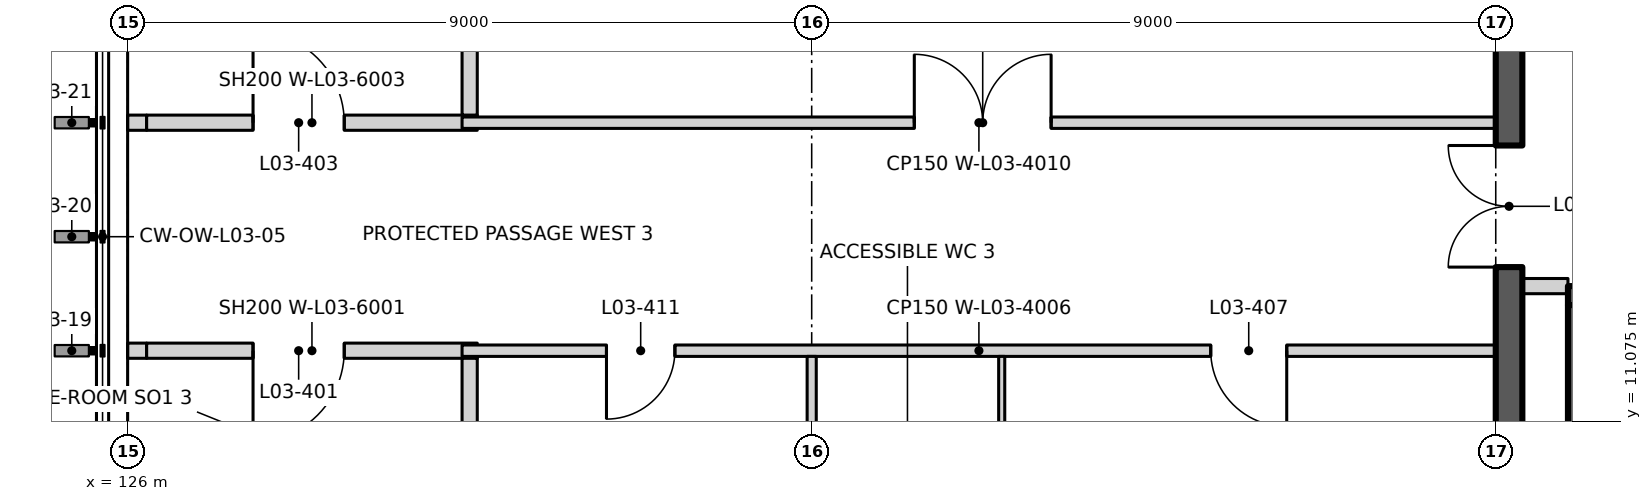
"""IFC4 building model, lengths in metres.
Left out: names, types, materials, properties, quantities, classifications, styles, units other than length and angle.
Written with IfcOpenShell. Run it as: python <this file> out.ifc"""

import sys

from ifc_helpers import new_model, si_unit, direction, frame, frame_2d, origin, place, context, subcontext, project, spatial, rectangle, extrude, element, fill, save


model = new_model("IFC4")
c1 = context("Model", 3, precision=1e-05, world=origin(), true_north=direction((0.0, 1.0)))
c2 = subcontext(c1, "Body", "Model", "MODEL_VIEW")
j1 = project(units=[si_unit("LENGTHUNIT", "METRE"), si_unit("PLANEANGLEUNIT", "RADIAN")], contexts=[c1])
p1 = place(None, origin())
s1 = spatial("IfcSite", under=j1, at=p1, CompositionType="ELEMENT")
p2 = place(p1, origin())
s2 = spatial("IfcBuilding", under=s1, at=p2, CompositionType="ELEMENT")
p3 = place(p2, frame((0.0, 0.0, 15.0)))
s3 = spatial("IfcBuildingStorey", under=s2, at=p3, CompositionType="ELEMENT", Elevation=15.0)
p4 = place(p3, frame((144.95, 12.725, 0.0), z_axis=(0.0, 0.0, 1.0), x_axis=(1.0, 0.0, 0.0)))
e1 = element("IfcWall", 1, at=p4, inside=s3, PredefinedType="SHEAR", context=c2, shape_type="SweptSolid", body=[
    extrude(rectangle(XDim=12.05, YDim=0.25, at=frame_2d((6.025, 0.0))), origin(), (0.0, 0.0, 1.0), 4.5),
])
p5 = place(p4, frame((1.05, 0.0, 0.0)))
e2 = element("IfcOpeningElement", 2, at=p5, cuts=e1, PredefinedType="OPENING", context=c2, shape_type="SweptSolid", body=[
    extrude(rectangle(XDim=1.1, YDim=2.1, at=frame_2d((0.55, 1.05))), frame((0.0, 0.135, 0.0), z_axis=(0.0, -1.0, 0.0), x_axis=(1.0, 0.0, 0.0)), (0.0, 0.0, 1.0), 0.27),
])
p6 = place(p4, frame((4.0, 0.0, 0.0)))
e3 = element("IfcOpeningElement", 3, at=p6, cuts=e1, PredefinedType="OPENING", context=c2, shape_type="SweptSolid", body=[
    extrude(rectangle(XDim=1.1, YDim=2.1, at=frame_2d((0.55, 1.05))), frame((0.0, 0.135, 0.0), z_axis=(0.0, -1.0, 0.0), x_axis=(1.0, 0.0, 0.0)), (0.0, 0.0, 1.0), 0.27),
])
p7 = place(p4, frame((6.95, 0.0, 0.0)))
e4 = element("IfcOpeningElement", 4, at=p7, cuts=e1, PredefinedType="OPENING", context=c2, shape_type="SweptSolid", body=[
    extrude(rectangle(XDim=1.1, YDim=2.1, at=frame_2d((0.55, 1.05))), frame((0.0, 0.135, 0.0), z_axis=(0.0, -1.0, 0.0), x_axis=(1.0, 0.0, 0.0)), (0.0, 0.0, 1.0), 0.27),
])
p8 = place(p4, frame((9.9, 0.0, 0.0)))
e5 = element("IfcOpeningElement", 5, at=p8, cuts=e1, PredefinedType="OPENING", context=c2, shape_type="SweptSolid", body=[
    extrude(rectangle(XDim=1.1, YDim=2.1, at=frame_2d((0.55, 1.05))), frame((0.0, 0.135, 0.0), z_axis=(0.0, -1.0, 0.0), x_axis=(1.0, 0.0, 0.0)), (0.0, 0.0, 1.0), 0.27),
])
p9 = place(p3, frame((145.075, 9.9, 0.0), z_axis=(0.0, 0.0, 1.0), x_axis=(0.0, 1.0, 0.0)))
e6 = element("IfcWall", 6, at=p9, inside=s3, PredefinedType="SHEAR", context=c2, shape_type="SweptSolid", body=[
    extrude(rectangle(XDim=2.7, YDim=0.25, at=frame_2d((1.35, 0.0))), origin(), (0.0, 0.0, 1.0), 4.5),
])
p10 = place(p3, frame((126.0, 12.0, 0.0), z_axis=(0.0, 0.0, 1.0), x_axis=(1.0, 0.0, 0.0)))
e7 = element("IfcWall", 7, at=p10, inside=s3, PredefinedType="PARTITIONING", context=c2, shape_type="SweptSolid", body=[
    extrude(rectangle(XDim=0.25, YDim=0.2, at=frame_2d((0.125, 0.0))), origin(), (0.0, 0.0, 1.0), 3.6),
])
p11 = place(p3, frame((126.25, 12.0, 0.0), z_axis=(0.0, 0.0, 1.0), x_axis=(1.0, 0.0, 0.0)))
e8 = element("IfcWall", 8, at=p11, inside=s3, PredefinedType="PARTITIONING", context=c2, shape_type="SweptSolid", body=[
    extrude(rectangle(XDim=4.35, YDim=0.2, at=frame_2d((2.175, 0.0))), origin(), (0.0, 0.0, 1.0), 4.2),
])
p12 = place(p11, frame((2.6, 0.0, 0.0), z_axis=(0.0, 0.0, 1.0), x_axis=(-1.0, 0.0, 0.0)))
e9 = element("IfcOpeningElement", 9, at=p12, cuts=e8, PredefinedType="OPENING", context=c2, shape_type="SweptSolid", body=[
    extrude(rectangle(XDim=1.2, YDim=2.1, at=frame_2d((0.6, 1.05))), frame((0.0, 0.11, 0.0), z_axis=(0.0, -1.0, 0.0), x_axis=(1.0, 0.0, 0.0)), (0.0, 0.0, 1.0), 0.22),
])
p13 = place(p3, frame((130.4, 12.0, 0.0), z_axis=(0.0, 0.0, 1.0), x_axis=(1.0, 0.0, 0.0)))
e10 = element("IfcWall", 10, at=p13, inside=s3, PredefinedType="PARTITIONING", context=c2, shape_type="SweptSolid", body=[
    extrude(rectangle(XDim=13.6, YDim=0.15, at=frame_2d((6.8, 0.0))), origin(), (0.0, 0.0, 1.0), 4.2),
])
p14 = place(p13, frame((10.85, 0.0, 0.0), z_axis=(0.0, 0.0, 1.0), x_axis=(-1.0, 0.0, 0.0)))
e11 = element("IfcOpeningElement", 11, at=p14, cuts=e10, PredefinedType="OPENING", context=c2, shape_type="SweptSolid", body=[
    extrude(rectangle(XDim=1.0, YDim=2.1, at=frame_2d((0.5, 1.05))), frame((0.0, 0.085, 0.0), z_axis=(0.0, -1.0, 0.0), x_axis=(1.0, 0.0, 0.0)), (0.0, 0.0, 1.0), 0.17),
])
p15 = place(p13, frame((2.8, 0.0, 0.0), z_axis=(0.0, 0.0, 1.0), x_axis=(-1.0, 0.0, 0.0)))
e12 = element("IfcOpeningElement", 12, at=p15, cuts=e10, PredefinedType="OPENING", context=c2, shape_type="SweptSolid", body=[
    extrude(rectangle(XDim=0.9, YDim=2.1, at=frame_2d((0.45, 1.05))), frame((0.0, 0.085, 0.0), z_axis=(0.0, -1.0, 0.0), x_axis=(1.0, 0.0, 0.0)), (0.0, 0.0, 1.0), 0.17),
])
p16 = place(p3, frame((144.35, 12.85, 0.0), z_axis=(0.0, 0.0, 1.0), x_axis=(1.0, 0.0, 0.0)))
e13 = element("IfcWall", 13, at=p16, inside=s3, PredefinedType="PARTITIONING", context=c2, shape_type="SweptSolid", body=[
    extrude(rectangle(XDim=0.6, YDim=0.2, at=frame_2d((0.3, 0.0))), origin(), (0.0, 0.0, 1.0), 4.2),
])
p17 = place(p3, frame((126.0, 15.0, 0.0), z_axis=(0.0, 0.0, 1.0), x_axis=(1.0, 0.0, 0.0)))
e14 = element("IfcWall", 14, at=p17, inside=s3, PredefinedType="PARTITIONING", context=c2, shape_type="SweptSolid", body=[
    extrude(rectangle(XDim=0.25, YDim=0.2, at=frame_2d((0.125, 0.0))), origin(), (0.0, 0.0, 1.0), 3.6),
])
p18 = place(p3, frame((126.25, 15.0, 0.0), z_axis=(0.0, 0.0, 1.0), x_axis=(1.0, 0.0, 0.0)))
e15 = element("IfcWall", 15, at=p18, inside=s3, PredefinedType="PARTITIONING", context=c2, shape_type="SweptSolid", body=[
    extrude(rectangle(XDim=4.35, YDim=0.2, at=frame_2d((2.175, 0.0))), origin(), (0.0, 0.0, 1.0), 4.2),
])
p19 = place(p18, frame((1.4, 0.0, 0.0)))
e16 = element("IfcOpeningElement", 16, at=p19, cuts=e15, PredefinedType="OPENING", context=c2, shape_type="SweptSolid", body=[
    extrude(rectangle(XDim=1.2, YDim=2.1, at=frame_2d((0.6, 1.05))), frame((0.0, 0.11, 0.0), z_axis=(0.0, -1.0, 0.0), x_axis=(1.0, 0.0, 0.0)), (0.0, 0.0, 1.0), 0.22),
])
p20 = place(p3, frame((130.4, 15.0, 0.0), z_axis=(0.0, 0.0, 1.0), x_axis=(1.0, 0.0, 0.0)))
e17 = element("IfcWall", 17, at=p20, inside=s3, PredefinedType="PARTITIONING", context=c2, shape_type="SweptSolid", body=[
    extrude(rectangle(XDim=13.6, YDim=0.15, at=frame_2d((6.8, 0.0))), origin(), (0.0, 0.0, 1.0), 4.2),
])
p21 = place(p20, frame((5.95, 0.0, 0.0)))
e18 = element("IfcOpeningElement", 18, at=p21, cuts=e17, PredefinedType="OPENING", context=c2, shape_type="SweptSolid", body=[
    extrude(rectangle(XDim=1.8, YDim=2.1, at=frame_2d((0.9, 1.05))), frame((0.0, 0.085, 0.0), z_axis=(0.0, -1.0, 0.0), x_axis=(1.0, 0.0, 0.0)), (0.0, 0.0, 1.0), 0.17),
])
for number, where, z_axis, x_axis in (
    (19, (130.5, 9.0, 0.0), (0.0, 0.0, 1.0), (0.0, 1.0, 0.0)),
    (20, (130.5, 15.1, 0.0), (0.0, 0.0, 1.0), (0.0, 1.0, 0.0)),
):
    element("IfcWall", number, at=place(p3, frame(where, z_axis=z_axis, x_axis=x_axis)), inside=s3, PredefinedType="PARTITIONING", context=c2, shape_type="SweptSolid", body=[
        extrude(rectangle(XDim=2.9, YDim=0.2, at=frame_2d((1.45, 0.0))), origin(), (0.0, 0.0, 1.0), 4.2),
    ])
p22 = place(p3, frame((135.0, 9.45, 0.0), z_axis=(0.0, 0.0, 1.0), x_axis=(0.0, 1.0, 0.0)))
e21 = element("IfcWall", 21, at=p22, inside=s3, PredefinedType="PARTITIONING", context=c2, shape_type="SweptSolid", body=[
    extrude(rectangle(XDim=2.475, YDim=0.12, at=frame_2d((1.238, 0.0))), origin(), (0.0, 0.0, 1.0), 4.2),
])
p23 = place(p3, frame((137.5, 7.54, 0.0), z_axis=(0.0, 0.0, 1.0), x_axis=(0.0, 1.0, 0.0)))
e22 = element("IfcWall", 22, at=p23, inside=s3, PredefinedType="PARTITIONING", context=c2, shape_type="SweptSolid", body=[
    extrude(rectangle(XDim=4.385, YDim=0.08, at=frame_2d((2.192, 0.0))), origin(), (0.0, 0.0, 1.0), 4.2),
])
p24 = place(p23, frame((1.71, 0.0, 0.0)))
e23 = element("IfcOpeningElement", 23, at=p24, cuts=e22, PredefinedType="OPENING", context=c2, shape_type="SweptSolid", body=[
    extrude(rectangle(XDim=1.0, YDim=2.1, at=frame_2d((0.5, 1.05))), frame((0.0, 0.05, 0.0), z_axis=(0.0, -1.0, 0.0), x_axis=(1.0, 0.0, 0.0)), (0.0, 0.0, 1.0), 0.1),
])
p25 = place(p3, frame((144.175, 9.35, 0.0), z_axis=(0.0, 0.0, 1.0), x_axis=(0.0, 1.0, 0.0)))
e24 = element("IfcWall", 24, at=p25, inside=s3, PredefinedType="SHEAR", context=c2, shape_type="SweptSolid", body=[
    extrude(rectangle(XDim=17.4, YDim=0.35, at=frame_2d((8.7, 0.0))), origin(), (0.0, 0.0, 1.0), 4.2),
])
p26 = place(p25, frame((3.75, 0.0, 0.0)))
e25 = element("IfcOpeningElement", 25, at=p26, cuts=e24, PredefinedType="OPENING", context=c2, shape_type="SweptSolid", body=[
    extrude(rectangle(XDim=1.6, YDim=2.4, at=frame_2d((0.8, 1.2))), frame((0.0, 0.185, 0.0), z_axis=(0.0, -1.0, 0.0), x_axis=(1.0, 0.0, 0.0)), (0.0, 0.0, 1.0), 0.37),
])
p27 = place(p12, origin())
e26 = element("IfcDoor", 26, at=p27, inside=s3, OperationType="SINGLE_SWING_RIGHT", PredefinedType="DOOR", context=c2, shape_type="SweptSolid", body=[
    extrude(rectangle(XDim=1.2, YDim=2.1, at=frame_2d((0.6, 1.05))), frame((0.0, 0.025, 0.0), z_axis=(0.0, -1.0, 0.0), x_axis=(1.0, 0.0, 0.0)), (0.0, 0.0, 1.0), 0.05),
])
fill(e9, e26)
p28 = place(p19, origin())
e27 = element("IfcDoor", 27, at=p28, inside=s3, OperationType="SINGLE_SWING_LEFT", PredefinedType="DOOR", context=c2, shape_type="SweptSolid", body=[
    extrude(rectangle(XDim=1.2, YDim=2.1, at=frame_2d((0.6, 1.05))), frame((0.0, 0.025, 0.0), z_axis=(0.0, -1.0, 0.0), x_axis=(1.0, 0.0, 0.0)), (0.0, 0.0, 1.0), 0.05),
])
fill(e16, e27)
p29 = place(p26, origin())
e28 = element("IfcDoor", 28, at=p29, inside=s3, OperationType="DOUBLE_DOOR_SINGLE_SWING", PredefinedType="DOOR", context=c2, shape_type="SweptSolid", body=[
    extrude(rectangle(XDim=1.6, YDim=2.4, at=frame_2d((0.8, 1.2))), frame((0.0, 0.025, 0.0), z_axis=(0.0, -1.0, 0.0), x_axis=(1.0, 0.0, 0.0)), (0.0, 0.0, 1.0), 0.05),
])
fill(e25, e28)
p30 = place(p14, origin())
e29 = element("IfcDoor", 29, at=p30, inside=s3, OperationType="SINGLE_SWING_LEFT", PredefinedType="DOOR", context=c2, shape_type="SweptSolid", body=[
    extrude(rectangle(XDim=1.0, YDim=2.1, at=frame_2d((0.5, 1.05))), frame((0.0, 0.025, 0.0), z_axis=(0.0, -1.0, 0.0), x_axis=(1.0, 0.0, 0.0)), (0.0, 0.0, 1.0), 0.05),
])
fill(e11, e29)
p31 = place(p15, origin())
e30 = element("IfcDoor", 30, at=p31, inside=s3, OperationType="SINGLE_SWING_RIGHT", PredefinedType="DOOR", context=c2, shape_type="SweptSolid", body=[
    extrude(rectangle(XDim=0.9, YDim=2.1, at=frame_2d((0.45, 1.05))), frame((0.0, 0.025, 0.0), z_axis=(0.0, -1.0, 0.0), x_axis=(1.0, 0.0, 0.0)), (0.0, 0.0, 1.0), 0.05),
])
fill(e12, e30)
p32 = place(p21, origin())
e31 = element("IfcDoor", 31, at=p32, inside=s3, OperationType="DOUBLE_DOOR_SINGLE_SWING", PredefinedType="DOOR", context=c2, shape_type="SweptSolid", body=[
    extrude(rectangle(XDim=1.8, YDim=2.1, at=frame_2d((0.9, 1.05))), frame((0.0, 0.025, 0.0), z_axis=(0.0, -1.0, 0.0), x_axis=(1.0, 0.0, 0.0)), (0.0, 0.0, 1.0), 0.05),
])
fill(e18, e31)
save(model, sys.argv[1])
